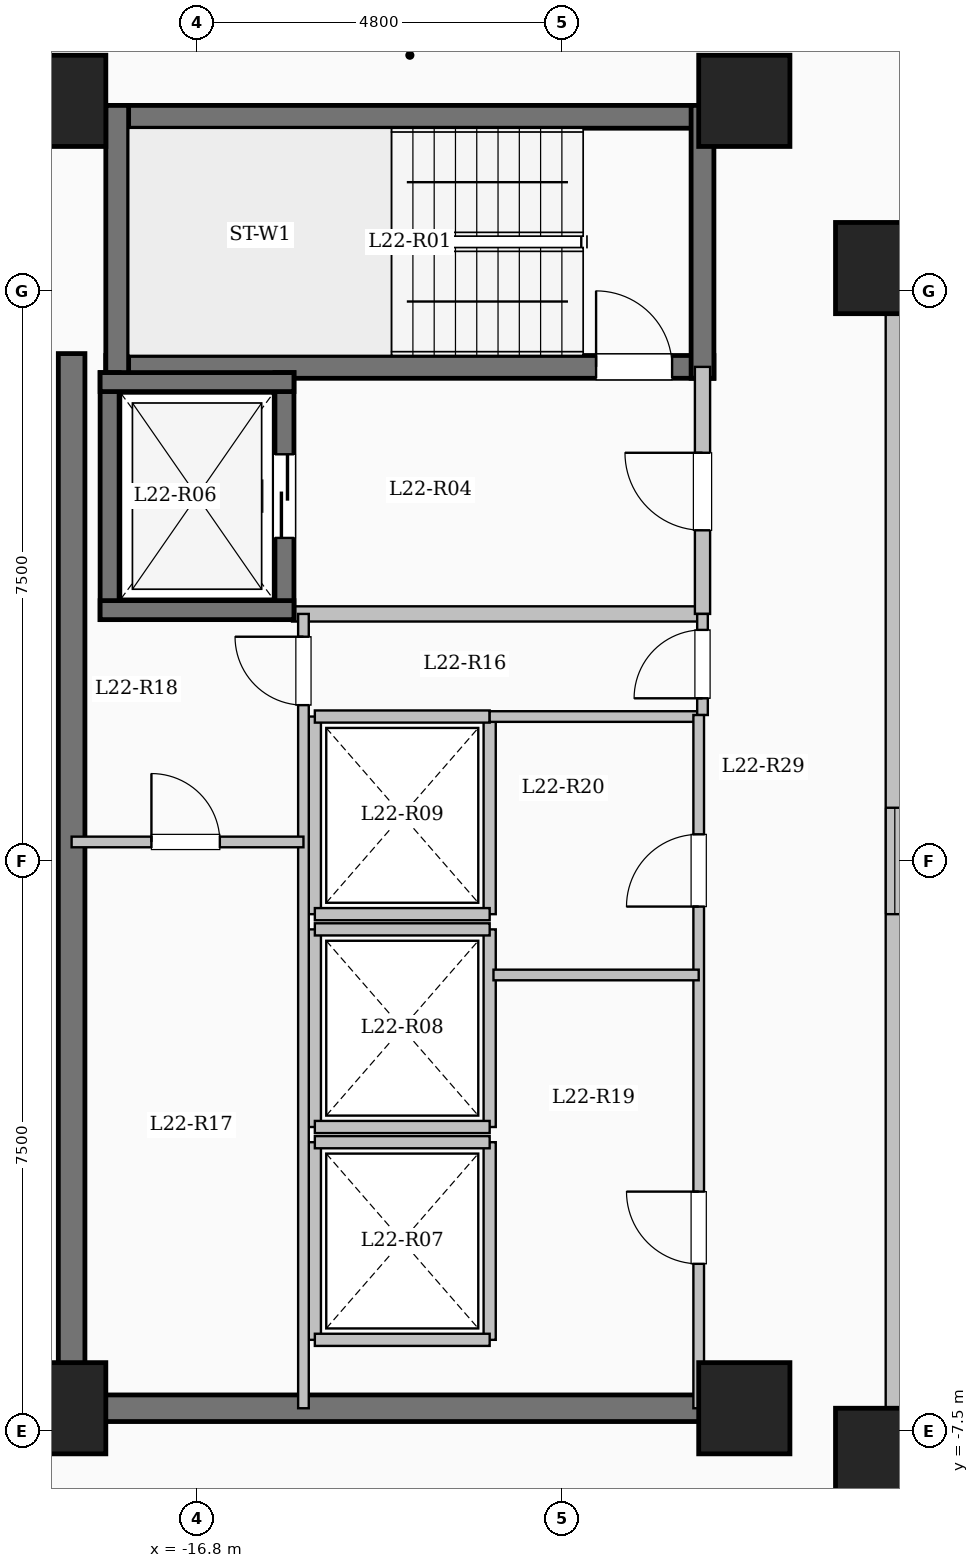
"""IFC4 building model, lengths in metres.
Left out: names, types, materials, properties, quantities, classifications, styles, units other than length and angle.
Written with IfcOpenShell. Run it as: python <this file> out.ifc"""

import sys

from ifc_helpers import new_model, si_unit, direction, frame, frame_2d, origin, origin_2d, place, context, subcontext, project, spatial, rectangle, extrude, element, fill, save


model = new_model("IFC4")
c1 = context("Model", 3, precision=1e-05, world=origin(), true_north=direction((0.0, 1.0)))
c2 = subcontext(c1, "Body", "Model", "MODEL_VIEW")
j1 = project(units=[si_unit("LENGTHUNIT", "METRE"), si_unit("PLANEANGLEUNIT", "RADIAN")], contexts=[c1])
p1 = place(None, origin())
s1 = spatial("IfcSite", under=j1, at=p1, CompositionType="ELEMENT")
p2 = place(p1, origin())
s2 = spatial("IfcBuilding", under=s1, at=p2, CompositionType="ELEMENT")
p3 = place(p2, frame((0.0, 0.0, 85.0)))
s3 = spatial("IfcBuildingStorey", under=s2, at=p3, CompositionType="ELEMENT", Elevation=85.0)
for number, where, z_axis, x_axis in (
    (1, (-7.8, -7.8, 0.0), (0.0, 0.0, 1.0), (1.0, 0.0, 0.0)),
    (2, (-7.8, 7.8, 0.0), (0.0, 0.0, 1.0), (1.0, 0.0, 0.0)),
    (3, (-9.6, -7.2, 0.0), (0.0, 0.0, 1.0), (1.0, 0.0, 0.0)),
    (4, (-9.6, 10.0, 0.0), (0.0, 0.0, 1.0), (1.0, 0.0, 0.0)),
    (5, (-18.6, -7.2, 0.0), (0.0, 0.0, 1.0), (1.0, 0.0, 0.0)),
    (6, (-18.6, 10.0, 0.0), (0.0, 0.0, 1.0), (1.0, 0.0, 0.0)),
):
    element("IfcColumn", number, at=place(p3, frame(where, z_axis=z_axis, x_axis=x_axis)), inside=s3, PredefinedType="COLUMN", context=c2, shape_type="SweptSolid", body=[
        extrude(rectangle(XDim=1.2, YDim=1.2, at=origin_2d()), origin(), (0.0, 0.0, 1.0), 3.35),
    ])
p4 = place(p3, frame((-7.62, -7.62, 0.0), z_axis=(0.0, 0.0, 1.0), x_axis=(1.0, 0.0, 0.0)))
e7 = element("IfcWall", 7, at=p4, inside=s3, PredefinedType="SOLIDWALL", context=c2, shape_type="SweptSolid", body=[
    extrude(rectangle(XDim=15.24, YDim=0.24, at=frame_2d((7.62, 0.0))), origin(), (0.0, 0.0, 1.0), 3.1),
])
p5 = place(p4, frame((6.92, 0.0, 0.95)))
e8 = element("IfcOpeningElement", 8, at=p5, cuts=e7, PredefinedType="OPENING", context=c2, shape_type="SweptSolid", body=[
    extrude(rectangle(XDim=1.4, YDim=1.5, at=frame_2d((0.7, 0.75))), frame((0.0, 0.13, 0.0), z_axis=(0.0, -1.0, 0.0), x_axis=(1.0, 0.0, 0.0)), (0.0, 0.0, 1.0), 0.26),
])
p6 = place(p3, frame((7.62, 7.62, 0.0), z_axis=(0.0, 0.0, 1.0), x_axis=(-1.0, 0.0, 0.0)))
e9 = element("IfcWall", 9, at=p6, inside=s3, PredefinedType="SOLIDWALL", context=c2, shape_type="SweptSolid", body=[
    extrude(rectangle(XDim=15.24, YDim=0.24, at=frame_2d((7.62, 0.0))), origin(), (0.0, 0.0, 1.0), 3.1),
])
p7 = place(p6, frame((6.92, 0.0, 0.95)))
e10 = element("IfcOpeningElement", 10, at=p7, cuts=e9, PredefinedType="OPENING", context=c2, shape_type="SweptSolid", body=[
    extrude(rectangle(XDim=1.4, YDim=1.5, at=frame_2d((0.7, 0.75))), frame((0.0, 0.13, 0.0), z_axis=(0.0, -1.0, 0.0), x_axis=(1.0, 0.0, 0.0)), (0.0, 0.0, 1.0), 0.26),
])
p8 = place(p3, frame((-7.62, 7.62, 0.0), z_axis=(0.0, 0.0, 1.0), x_axis=(0.0, -1.0, 0.0)))
e11 = element("IfcWall", 11, at=p8, inside=s3, PredefinedType="SOLIDWALL", context=c2, shape_type="SweptSolid", body=[
    extrude(rectangle(XDim=15.24, YDim=0.24, at=frame_2d((7.62, 0.0))), origin(), (0.0, 0.0, 1.0), 3.1),
])
p9 = place(p8, frame((6.92, 0.0, 0.95)))
e12 = element("IfcOpeningElement", 12, at=p9, cuts=e11, PredefinedType="OPENING", context=c2, shape_type="SweptSolid", body=[
    extrude(rectangle(XDim=1.4, YDim=1.5, at=frame_2d((0.7, 0.75))), frame((0.0, 0.13, 0.0), z_axis=(0.0, -1.0, 0.0), x_axis=(1.0, 0.0, 0.0)), (0.0, 0.0, 1.0), 0.26),
])
p10 = place(p3, frame((-18.0, 9.79, 0.0), z_axis=(0.0, 0.0, 1.0), x_axis=(1.0, 0.0, 0.0)))
e13 = element("IfcWall", 13, at=p10, inside=s3, PredefinedType="SHEAR", context=c2, shape_type="SweptSolid", body=[
    extrude(rectangle(XDim=8.0, YDim=0.3, at=frame_2d((4.0, 0.0))), origin(), (0.0, 0.0, 1.0), 3.35),
])
p11 = place(p3, frame((-18.0, 6.5, 0.0), z_axis=(0.0, 0.0, 1.0), x_axis=(1.0, 0.0, 0.0)))
e14 = element("IfcWall", 14, at=p11, inside=s3, PredefinedType="SHEAR", context=c2, shape_type="SweptSolid", body=[
    extrude(rectangle(XDim=8.0, YDim=0.3, at=frame_2d((4.0, 0.0))), origin(), (0.0, 0.0, 1.0), 3.35),
])
p12 = place(p11, frame((6.45, 0.0, 0.0)))
e15 = element("IfcOpeningElement", 15, at=p12, cuts=e14, PredefinedType="OPENING", context=c2, shape_type="SweptSolid", body=[
    extrude(rectangle(XDim=1.0, YDim=2.15, at=frame_2d((0.5, 1.075))), frame((0.0, 0.16, 0.0), z_axis=(0.0, -1.0, 0.0), x_axis=(1.0, 0.0, 0.0)), (0.0, 0.0, 1.0), 0.32),
])
for number, where, z_axis, x_axis in (
    (16, (-17.85, 6.35, 0.0), (0.0, 0.0, 1.0), (0.0, 1.0, 0.0)),
    (17, (-10.15, 6.35, 0.0), (0.0, 0.0, 1.0), (0.0, 1.0, 0.0)),
):
    element("IfcWall", number, at=place(p3, frame(where, z_axis=z_axis, x_axis=x_axis)), inside=s3, PredefinedType="SHEAR", context=c2, shape_type="SweptSolid", body=[
        extrude(rectangle(XDim=3.59, YDim=0.3, at=frame_2d((1.795, 0.0))), origin(), (0.0, 0.0, 1.0), 3.35),
    ])
p13 = place(p3, frame((-15.55, 3.25, 0.0), z_axis=(0.0, 0.0, 1.0), x_axis=(1.0, 0.0, 0.0)))
e18 = element("IfcWall", 18, at=p13, inside=s3, PredefinedType="SOLIDWALL", context=c2, shape_type="SweptSolid", body=[
    extrude(rectangle(XDim=5.4, YDim=0.2, at=frame_2d((2.7, 0.0))), origin(), (0.0, 0.0, 1.0), 3.1),
])
p14 = place(p3, frame((-10.15, 3.25, 0.0), z_axis=(0.0, 0.0, 1.0), x_axis=(0.0, 1.0, 0.0)))
e19 = element("IfcWall", 19, at=p14, inside=s3, PredefinedType="SOLIDWALL", context=c2, shape_type="SweptSolid", body=[
    extrude(rectangle(XDim=3.25, YDim=0.2, at=frame_2d((1.625, 0.0))), origin(), (0.0, 0.0, 1.0), 3.1),
])
p15 = place(p14, frame((1.1, 0.0, 0.0)))
e20 = element("IfcOpeningElement", 20, at=p15, cuts=e19, PredefinedType="OPENING", context=c2, shape_type="SweptSolid", body=[
    extrude(rectangle(XDim=1.02, YDim=2.15, at=frame_2d((0.51, 1.075))), frame((0.0, 0.11, 0.0), z_axis=(0.0, -1.0, 0.0), x_axis=(1.0, 0.0, 0.0)), (0.0, 0.0, 1.0), 0.22),
])
p16 = place(p3, frame((-17.95, 3.175, 0.0), z_axis=(0.0, 0.0, 1.0), x_axis=(0.0, 1.0, 0.0)))
e21 = element("IfcWall", 21, at=p16, inside=s3, PredefinedType="SHEAR", context=c2, shape_type="SweptSolid", body=[
    extrude(rectangle(XDim=3.25, YDim=0.25, at=frame_2d((1.625, 0.0))), origin(), (0.0, 0.0, 1.0), 3.35),
])
p17 = place(p3, frame((-15.65, 3.175, 0.0), z_axis=(0.0, 0.0, 1.0), x_axis=(0.0, 1.0, 0.0)))
e22 = element("IfcWall", 22, at=p17, inside=s3, PredefinedType="SHEAR", context=c2, shape_type="SweptSolid", body=[
    extrude(rectangle(XDim=3.25, YDim=0.25, at=frame_2d((1.625, 0.0))), origin(), (0.0, 0.0, 1.0), 3.35),
])
p18 = place(p17, frame((1.075, 0.0, 0.0)))
e23 = element("IfcOpeningElement", 23, at=p18, cuts=e22, PredefinedType="OPENING", context=c2, shape_type="SweptSolid", body=[
    extrude(rectangle(XDim=1.1, YDim=2.15, at=frame_2d((0.55, 1.075))), frame((0.0, 0.135, 0.0), z_axis=(0.0, -1.0, 0.0), x_axis=(1.0, 0.0, 0.0)), (0.0, 0.0, 1.0), 0.27),
])
for number, where, z_axis, x_axis in (
    (24, (-18.075, 3.3, 0.0), (0.0, 0.0, 1.0), (1.0, 0.0, 0.0)),
    (25, (-18.075, 6.3, 0.0), (0.0, 0.0, 1.0), (1.0, 0.0, 0.0)),
):
    element("IfcWall", number, at=place(p3, frame(where, z_axis=z_axis, x_axis=x_axis)), inside=s3, PredefinedType="SHEAR", context=c2, shape_type="SweptSolid", body=[
        extrude(rectangle(XDim=2.55, YDim=0.25, at=frame_2d((1.275, 0.0))), origin(), (0.0, 0.0, 1.0), 3.35),
    ])
for number, where, z_axis, x_axis in (
    (26, (-15.25, -6.3, 0.0), (0.0, 0.0, 1.0), (0.0, 1.0, 0.0)),
    (27, (-12.95, -6.3, 0.0), (0.0, 0.0, 1.0), (0.0, 1.0, 0.0)),
):
    element("IfcWall", number, at=place(p3, frame(where, z_axis=z_axis, x_axis=x_axis)), inside=s3, PredefinedType="SOLIDWALL", context=c2, shape_type="SweptSolid", body=[
        extrude(rectangle(XDim=2.6, YDim=0.16, at=frame_2d((1.3, 0.0))), origin(), (0.0, 0.0, 1.0), 3.1),
    ])
for number, where, z_axis, x_axis in (
    (28, (-15.25, -6.3, 0.0), (0.0, 0.0, 1.0), (1.0, 0.0, 0.0)),
    (29, (-15.25, -3.7, 0.0), (0.0, 0.0, 1.0), (1.0, 0.0, 0.0)),
):
    element("IfcWall", number, at=place(p3, frame(where, z_axis=z_axis, x_axis=x_axis)), inside=s3, PredefinedType="SOLIDWALL", context=c2, shape_type="SweptSolid", body=[
        extrude(rectangle(XDim=2.3, YDim=0.16, at=frame_2d((1.15, 0.0))), origin(), (0.0, 0.0, 1.0), 3.1),
    ])
for number, where, z_axis, x_axis in (
    (30, (-15.25, -3.5, 0.0), (0.0, 0.0, 1.0), (0.0, 1.0, 0.0)),
    (31, (-12.95, -3.5, 0.0), (0.0, 0.0, 1.0), (0.0, 1.0, 0.0)),
):
    element("IfcWall", number, at=place(p3, frame(where, z_axis=z_axis, x_axis=x_axis)), inside=s3, PredefinedType="SOLIDWALL", context=c2, shape_type="SweptSolid", body=[
        extrude(rectangle(XDim=2.6, YDim=0.16, at=frame_2d((1.3, 0.0))), origin(), (0.0, 0.0, 1.0), 3.1),
    ])
for number, where, z_axis, x_axis in (
    (32, (-15.25, -3.5, 0.0), (0.0, 0.0, 1.0), (1.0, 0.0, 0.0)),
    (33, (-15.25, -0.9, 0.0), (0.0, 0.0, 1.0), (1.0, 0.0, 0.0)),
):
    element("IfcWall", number, at=place(p3, frame(where, z_axis=z_axis, x_axis=x_axis)), inside=s3, PredefinedType="SOLIDWALL", context=c2, shape_type="SweptSolid", body=[
        extrude(rectangle(XDim=2.3, YDim=0.16, at=frame_2d((1.15, 0.0))), origin(), (0.0, 0.0, 1.0), 3.1),
    ])
for number, where, z_axis, x_axis in (
    (34, (-15.25, -0.7, 0.0), (0.0, 0.0, 1.0), (0.0, 1.0, 0.0)),
    (35, (-12.95, -0.7, 0.0), (0.0, 0.0, 1.0), (0.0, 1.0, 0.0)),
):
    element("IfcWall", number, at=place(p3, frame(where, z_axis=z_axis, x_axis=x_axis)), inside=s3, PredefinedType="SOLIDWALL", context=c2, shape_type="SweptSolid", body=[
        extrude(rectangle(XDim=2.6, YDim=0.16, at=frame_2d((1.3, 0.0))), origin(), (0.0, 0.0, 1.0), 3.1),
    ])
for number, where, z_axis, x_axis in (
    (36, (-15.25, -0.7, 0.0), (0.0, 0.0, 1.0), (1.0, 0.0, 0.0)),
    (37, (-15.25, 1.9, 0.0), (0.0, 0.0, 1.0), (1.0, 0.0, 0.0)),
):
    element("IfcWall", number, at=place(p3, frame(where, z_axis=z_axis, x_axis=x_axis)), inside=s3, PredefinedType="SOLIDWALL", context=c2, shape_type="SweptSolid", body=[
        extrude(rectangle(XDim=2.3, YDim=0.16, at=frame_2d((1.15, 0.0))), origin(), (0.0, 0.0, 1.0), 3.1),
    ])
p19 = place(p3, frame((-18.45, -7.375, 0.0), z_axis=(0.0, 0.0, 1.0), x_axis=(0.0, 1.0, 0.0)))
e38 = element("IfcWall", 38, at=p19, inside=s3, PredefinedType="SHEAR", context=c2, shape_type="SweptSolid", body=[
    extrude(rectangle(XDim=14.05, YDim=0.35, at=frame_2d((7.025, 0.0))), origin(), (0.0, 0.0, 1.0), 3.35),
])
p20 = place(p3, frame((-18.625, -7.2, 0.0), z_axis=(0.0, 0.0, 1.0), x_axis=(1.0, 0.0, 0.0)))
e39 = element("IfcWall", 39, at=p20, inside=s3, PredefinedType="SHEAR", context=c2, shape_type="SweptSolid", body=[
    extrude(rectangle(XDim=8.55, YDim=0.35, at=frame_2d((4.275, 0.0))), origin(), (0.0, 0.0, 1.0), 3.35),
])
p21 = place(p3, frame((-12.95, 1.9, 0.0), z_axis=(0.0, 0.0, 1.0), x_axis=(1.0, 0.0, 0.0)))
e40 = element("IfcWall", 40, at=p21, inside=s3, PredefinedType="PARTITIONING", context=c2, shape_type="SweptSolid", body=[
    extrude(rectangle(XDim=2.8, YDim=0.14, at=frame_2d((1.4, 0.0))), origin(), (0.0, 0.0, 1.0), 3.1),
])
p22 = place(p3, frame((-10.15, 1.92, 0.0), z_axis=(0.0, 0.0, 1.0), x_axis=(0.0, 1.0, 0.0)))
e41 = element("IfcWall", 41, at=p22, inside=s3, PredefinedType="PARTITIONING", context=c2, shape_type="SweptSolid", body=[
    extrude(rectangle(XDim=1.33, YDim=0.14, at=frame_2d((0.665, 0.0))), origin(), (0.0, 0.0, 1.0), 3.1),
])
p23 = place(p22, frame((0.22, 0.0, 0.0)))
e42 = element("IfcOpeningElement", 42, at=p23, cuts=e41, PredefinedType="OPENING", context=c2, shape_type="SweptSolid", body=[
    extrude(rectangle(XDim=0.9, YDim=2.08, at=frame_2d((0.45, 1.04))), frame((0.0, 0.08, 0.0), z_axis=(0.0, -1.0, 0.0), x_axis=(1.0, 0.0, 0.0)), (0.0, 0.0, 1.0), 0.16),
])
p24 = place(p3, frame((-15.4, -7.2, 0.0), z_axis=(0.0, 0.0, 1.0), x_axis=(0.0, 1.0, 0.0)))
e43 = element("IfcWall", 43, at=p24, inside=s3, PredefinedType="PARTITIONING", context=c2, shape_type="SweptSolid", body=[
    extrude(rectangle(XDim=10.45, YDim=0.14, at=frame_2d((5.225, 0.0))), origin(), (0.0, 0.0, 1.0), 3.1),
])
p25 = place(p24, frame((9.25, 0.0, 0.0)))
e44 = element("IfcOpeningElement", 44, at=p25, cuts=e43, PredefinedType="OPENING", context=c2, shape_type="SweptSolid", body=[
    extrude(rectangle(XDim=0.9, YDim=2.08, at=frame_2d((0.45, 1.04))), frame((0.0, 0.08, 0.0), z_axis=(0.0, -1.0, 0.0), x_axis=(1.0, 0.0, 0.0)), (0.0, 0.0, 1.0), 0.16),
])
p26 = place(p3, frame((-18.45, 0.25, 0.0), z_axis=(0.0, 0.0, 1.0), x_axis=(1.0, 0.0, 0.0)))
e45 = element("IfcWall", 45, at=p26, inside=s3, PredefinedType="PARTITIONING", context=c2, shape_type="SweptSolid", body=[
    extrude(rectangle(XDim=3.05, YDim=0.14, at=frame_2d((1.525, 0.0))), origin(), (0.0, 0.0, 1.0), 3.1),
])
p27 = place(p26, frame((1.05, 0.0, 0.0)))
e46 = element("IfcOpeningElement", 46, at=p27, cuts=e45, PredefinedType="OPENING", context=c2, shape_type="SweptSolid", body=[
    extrude(rectangle(XDim=0.9, YDim=2.08, at=frame_2d((0.45, 1.04))), frame((0.0, 0.08, 0.0), z_axis=(0.0, -1.0, 0.0), x_axis=(1.0, 0.0, 0.0)), (0.0, 0.0, 1.0), 0.16),
])
p28 = place(p3, frame((-10.2, -7.2, 0.0), z_axis=(0.0, 0.0, 1.0), x_axis=(0.0, 1.0, 0.0)))
e47 = element("IfcWall", 47, at=p28, inside=s3, PredefinedType="PARTITIONING", context=c2, shape_type="SweptSolid", body=[
    extrude(rectangle(XDim=9.12, YDim=0.14, at=frame_2d((4.56, 0.0))), origin(), (0.0, 0.0, 1.0), 3.1),
])
p29 = place(p28, frame((1.9, 0.0, 0.0)))
e48 = element("IfcOpeningElement", 48, at=p29, cuts=e47, PredefinedType="OPENING", context=c2, shape_type="SweptSolid", body=[
    extrude(rectangle(XDim=0.95, YDim=2.12, at=frame_2d((0.475, 1.06))), frame((0.0, 0.08, 0.0), z_axis=(0.0, -1.0, 0.0), x_axis=(1.0, 0.0, 0.0)), (0.0, 0.0, 1.0), 0.16),
])
p30 = place(p28, frame((6.6, 0.0, 0.0)))
e49 = element("IfcOpeningElement", 49, at=p30, cuts=e47, PredefinedType="OPENING", context=c2, shape_type="SweptSolid", body=[
    extrude(rectangle(XDim=0.95, YDim=2.12, at=frame_2d((0.475, 1.06))), frame((0.0, 0.08, 0.0), z_axis=(0.0, -1.0, 0.0), x_axis=(1.0, 0.0, 0.0)), (0.0, 0.0, 1.0), 0.16),
])
p31 = place(p3, frame((-12.9, -1.5, 0.0), z_axis=(0.0, 0.0, 1.0), x_axis=(1.0, 0.0, 0.0)))
e50 = element("IfcWall", 50, at=p31, inside=s3, PredefinedType="PARTITIONING", context=c2, shape_type="SweptSolid", body=[
    extrude(rectangle(XDim=2.7, YDim=0.14, at=frame_2d((1.35, 0.0))), origin(), (0.0, 0.0, 1.0), 3.1),
])
p32 = place(p3, frame((-26.88, -7.25, 0.0), z_axis=(0.0, 0.0, 1.0), x_axis=(1.0, 0.0, 0.0)))
e51 = element("IfcWall", 51, at=p32, inside=s3, PredefinedType="PARTITIONING", context=c2, shape_type="SweptSolid", body=[
    extrude(rectangle(XDim=8.43, YDim=0.15, at=frame_2d((4.215, 0.0))), origin(), (0.0, 0.0, 1.0), 3.1),
])
p33 = place(p32, frame((5.23, 0.0, 0.0)))
e52 = element("IfcOpeningElement", 52, at=p33, cuts=e51, PredefinedType="OPENING", context=c2, shape_type="SweptSolid", body=[
    extrude(rectangle(XDim=1.08, YDim=2.15, at=frame_2d((0.54, 1.075))), frame((0.0, 0.085, 0.0), z_axis=(0.0, -1.0, 0.0), x_axis=(1.0, 0.0, 0.0)), (0.0, 0.0, 1.0), 0.17),
])
p34 = place(p9, origin())
e53 = element("IfcWindow", 53, at=p34, inside=s3, PartitioningType="SINGLE_PANEL", PredefinedType="WINDOW", context=c2, shape_type="SweptSolid", body=[
    extrude(rectangle(XDim=1.4, YDim=1.5, at=frame_2d((0.7, 0.75))), frame((0.0, 0.03, 0.0), z_axis=(0.0, -1.0, 0.0), x_axis=(1.0, 0.0, 0.0)), (0.0, 0.0, 1.0), 0.06),
])
fill(e12, e53)
p35 = place(p12, origin())
e54 = element("IfcDoor", 54, at=p35, inside=s3, OperationType="SINGLE_SWING_LEFT", PredefinedType="DOOR", context=c2, shape_type="SweptSolid", body=[
    extrude(rectangle(XDim=1.0, YDim=2.15, at=frame_2d((0.5, 1.075))), frame((0.0, 0.025, 0.0), z_axis=(0.0, -1.0, 0.0), x_axis=(1.0, 0.0, 0.0)), (0.0, 0.0, 1.0), 0.05),
])
fill(e15, e54)
p36 = place(p15, origin())
e55 = element("IfcDoor", 55, at=p36, inside=s3, OperationType="SINGLE_SWING_RIGHT", PredefinedType="DOOR", context=c2, shape_type="SweptSolid", body=[
    extrude(rectangle(XDim=1.02, YDim=2.15, at=frame_2d((0.51, 1.075))), frame((0.0, 0.025, 0.0), z_axis=(0.0, -1.0, 0.0), x_axis=(1.0, 0.0, 0.0)), (0.0, 0.0, 1.0), 0.05),
])
fill(e20, e55)
p37 = place(p18, origin())
e56 = element("IfcDoor", 56, at=p37, inside=s3, OperationType="SLIDING_TO_LEFT", PredefinedType="DOOR", context=c2, shape_type="SweptSolid", body=[
    extrude(rectangle(XDim=1.1, YDim=2.15, at=frame_2d((0.55, 1.075))), frame((0.0, 0.025, 0.0), z_axis=(0.0, -1.0, 0.0), x_axis=(1.0, 0.0, 0.0)), (0.0, 0.0, 1.0), 0.05),
])
fill(e23, e56)
p38 = place(p23, origin())
e57 = element("IfcDoor", 57, at=p38, inside=s3, OperationType="SINGLE_SWING_LEFT", PredefinedType="DOOR", context=c2, shape_type="SweptSolid", body=[
    extrude(rectangle(XDim=0.9, YDim=2.08, at=frame_2d((0.45, 1.04))), frame((0.0, 0.025, 0.0), z_axis=(0.0, -1.0, 0.0), x_axis=(1.0, 0.0, 0.0)), (0.0, 0.0, 1.0), 0.05),
])
fill(e42, e57)
p39 = place(p25, origin())
e58 = element("IfcDoor", 58, at=p39, inside=s3, OperationType="SINGLE_SWING_RIGHT", PredefinedType="DOOR", context=c2, shape_type="SweptSolid", body=[
    extrude(rectangle(XDim=0.9, YDim=2.08, at=frame_2d((0.45, 1.04))), frame((0.0, 0.025, 0.0), z_axis=(0.0, -1.0, 0.0), x_axis=(1.0, 0.0, 0.0)), (0.0, 0.0, 1.0), 0.05),
])
fill(e44, e58)
p40 = place(p27, origin())
e59 = element("IfcDoor", 59, at=p40, inside=s3, OperationType="SINGLE_SWING_LEFT", PredefinedType="DOOR", context=c2, shape_type="SweptSolid", body=[
    extrude(rectangle(XDim=0.9, YDim=2.08, at=frame_2d((0.45, 1.04))), frame((0.0, 0.025, 0.0), z_axis=(0.0, -1.0, 0.0), x_axis=(1.0, 0.0, 0.0)), (0.0, 0.0, 1.0), 0.05),
])
fill(e46, e59)
p41 = place(p29, origin())
e60 = element("IfcDoor", 60, at=p41, inside=s3, OperationType="SINGLE_SWING_RIGHT", PredefinedType="DOOR", context=c2, shape_type="SweptSolid", body=[
    extrude(rectangle(XDim=0.95, YDim=2.12, at=frame_2d((0.475, 1.06))), frame((0.0, 0.025, 0.0), z_axis=(0.0, -1.0, 0.0), x_axis=(1.0, 0.0, 0.0)), (0.0, 0.0, 1.0), 0.05),
])
fill(e48, e60)
p42 = place(p30, origin())
e61 = element("IfcDoor", 61, at=p42, inside=s3, OperationType="SINGLE_SWING_LEFT", PredefinedType="DOOR", context=c2, shape_type="SweptSolid", body=[
    extrude(rectangle(XDim=0.95, YDim=2.12, at=frame_2d((0.475, 1.06))), frame((0.0, 0.025, 0.0), z_axis=(0.0, -1.0, 0.0), x_axis=(1.0, 0.0, 0.0)), (0.0, 0.0, 1.0), 0.05),
])
fill(e49, e61)
save(model, sys.argv[1])
